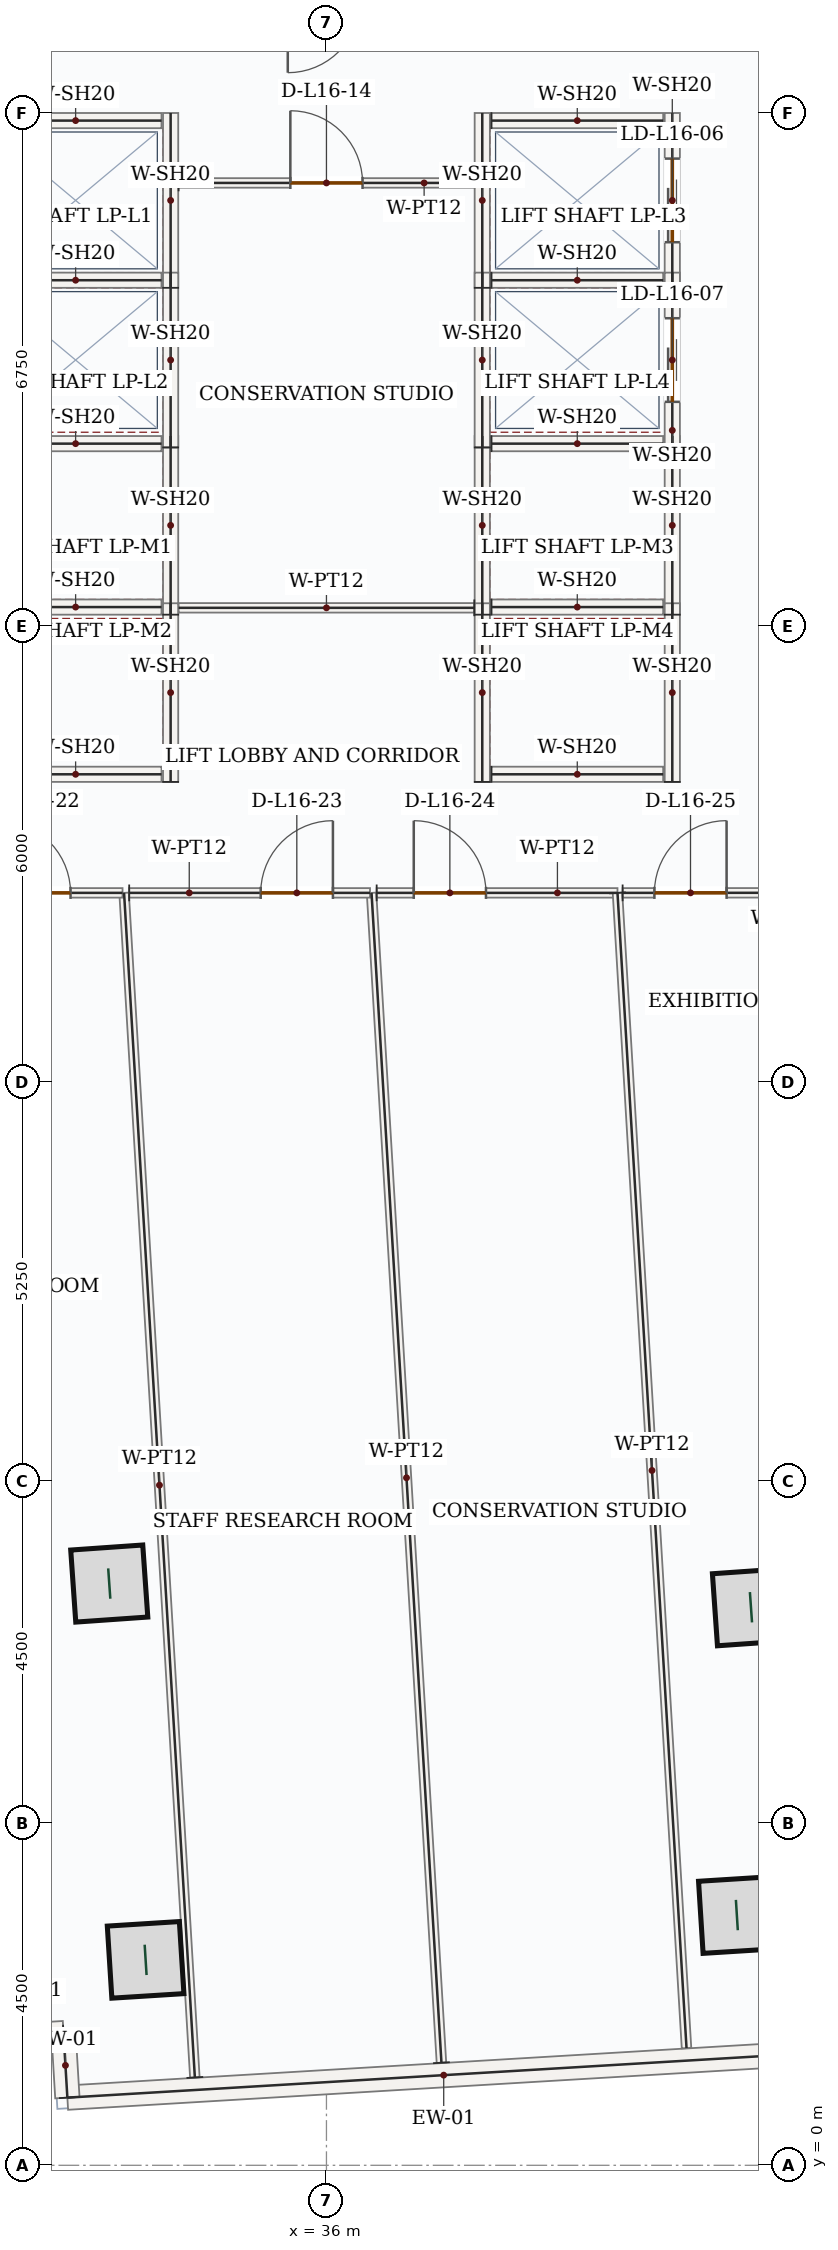
"""IFC4 building model, lengths in metres.
Left out: names, types, materials, properties, quantities, classifications, styles, units other than length and angle.
Written with IfcOpenShell. Run it as: python <this file> out.ifc"""

import sys

from ifc_helpers import new_model, si_unit, direction, frame, frame_2d, origin, origin_2d, place, context, subcontext, project, spatial, rectangle, hollow_rectangle, extrude, source, transform, mapped, element, fill, save


model = new_model("IFC4")
c1 = context("Model", 3, precision=1e-05, world=origin(), true_north=direction((0.0, 1.0)))
c2 = subcontext(c1, "Body", "Model", "MODEL_VIEW")
j1 = project(units=[si_unit("LENGTHUNIT", "METRE"), si_unit("PLANEANGLEUNIT", "RADIAN")], contexts=[c1])
p1 = place(None, origin())
s1 = spatial("IfcSite", under=j1, at=p1, CompositionType="ELEMENT")
p2 = place(p1, origin())
s2 = spatial("IfcBuilding", under=s1, at=p2, CompositionType="ELEMENT")
p3 = place(p2, frame((0.0, 0.0, 75.3)))
s3 = spatial("IfcBuildingStorey", under=s2, at=p3, CompositionType="ELEMENT", Elevation=75.3)
m1 = source(origin(), c2, "Body", "SweptSolid", [
    extrude(hollow_rectangle(XDim=0.95, YDim=0.95, WallThickness=0.05, at=origin_2d()), origin(), (0.0, 0.0, 1.0), 4.2),
])
for number, where, z_axis, x_axis in (
    (1, (33.143, 7.654, 0.0), (0.0, 0.0, 1.0), (-0.07, 0.998, 0.0)),
    (2, (41.585, 7.342, 0.0), (0.0, 0.0, 1.0), (-0.07, 0.998, 0.0)),
    (3, (33.621, 2.703, 0.0), (0.0, 0.0, 1.0), (-0.063, 0.998, 0.0)),
    (4, (41.399, 3.292, 0.0), (0.0, 0.0, 1.0), (-0.063, 0.998, 0.0)),
):
    element("IfcColumn", number, at=place(p3, frame(where, z_axis=z_axis, x_axis=x_axis)), inside=s3, PredefinedType="COLUMN", context=c2, shape_type="MappedRepresentation", body=[
        mapped(m1, transform((0.0, 0.0, 0.0), x_axis=(1.0, 0.0, 0.0), y_axis=(0.0, 1.0, 0.0), z_axis=(0.0, 0.0, 1.0), scale=1.0)),
    ])
m2 = source(origin(), c2, "Body", "SweptSolid", [
    extrude(rectangle(XDim=9.92, YDim=0.32, at=frame_2d((4.96, 0.0))), origin(), (0.0, 0.0, 1.0), 3.95),
])
p4 = place(p3, frame((42.494, 1.482, 0.0), z_axis=(0.0, 0.0, 1.0), x_axis=(-0.998218942745, -0.059656871726, 0.0)))
e5 = element("IfcWall", 5, at=p4, inside=s3, PredefinedType="SOLIDWALL", context=c2, shape_type="MappedRepresentation", body=[
    mapped(m2, transform((0.0, 0.0, 0.0), x_axis=(1.0, 0.0, 0.0), y_axis=(0.0, 1.0, 0.0), z_axis=(0.0, 0.0, 1.0), scale=1.0)),
])
m3 = source(origin(), c2, "Body", "SweptSolid", [
    extrude(rectangle(XDim=0.85, YDim=0.32, at=frame_2d((0.425, 0.0))), origin(), (0.0, 0.0, 1.0), 3.95),
])
p5 = place(p3, frame((32.592, 0.89, 0.0), z_axis=(0.0, 0.0, 1.0), x_axis=(-0.059732049764, 0.998214447016, 0.0)))
e6 = element("IfcWall", 6, at=p5, inside=s3, PredefinedType="SOLIDWALL", context=c2, shape_type="MappedRepresentation", body=[
    mapped(m3, transform((0.0, 0.0, 0.0), x_axis=(1.0, 0.0, 0.0), y_axis=(0.0, 1.0, 0.0), z_axis=(0.0, 0.0, 1.0), scale=1.0)),
])
m4 = source(origin(), c2, "Body", "SweptSolid", [
    extrude(rectangle(XDim=0.85, YDim=0.32, at=frame_2d((0.425, 0.0))), origin(), (0.0, 0.0, 1.0), 3.95),
])
p6 = place(p3, frame((32.541, 1.739, 0.0), z_axis=(0.0, 0.0, 1.0), x_axis=(-0.998213421964, -0.059749177487, 0.0)))
e7 = element("IfcWall", 7, at=p6, inside=s3, PredefinedType="SOLIDWALL", context=c2, shape_type="MappedRepresentation", body=[
    mapped(m4, transform((0.0, 0.0, 0.0), x_axis=(1.0, 0.0, 0.0), y_axis=(0.0, 1.0, 0.0), z_axis=(0.0, 0.0, 1.0), scale=1.0)),
])
m5 = source(origin(), c2, "Body", "SweptSolid", [
    extrude(rectangle(XDim=2.35, YDim=0.2, at=frame_2d((1.175, 0.0))), origin(), (0.0, 0.0, 1.0), 3.95),
])
p7 = place(p3, frame((33.95, 20.4, 0.0), z_axis=(0.0, 0.0, 1.0), x_axis=(0.0, 1.0, 0.0)))
e8 = element("IfcWall", 8, at=p7, inside=s3, PredefinedType="SOLIDWALL", context=c2, shape_type="MappedRepresentation", body=[
    mapped(m5, transform((0.0, 0.0, 0.0), x_axis=(1.0, 0.0, 0.0), y_axis=(0.0, 1.0, 0.0), z_axis=(0.0, 0.0, 1.0), scale=1.0)),
])
m6 = source(origin(), c2, "Body", "SweptSolid", [
    extrude(rectangle(XDim=2.26, YDim=0.2, at=frame_2d((1.13, 0.0))), origin(), (0.0, 0.0, 1.0), 3.95),
])
for number, where, z_axis, x_axis in (
    (9, (31.57, 20.5, 0.0), (0.0, 0.0, 1.0), (1.0, 0.0, 0.0)),
    (10, (31.57, 22.65, 0.0), (0.0, 0.0, 1.0), (1.0, 0.0, 0.0)),
):
    element("IfcWall", number, at=place(p3, frame(where, z_axis=z_axis, x_axis=x_axis)), inside=s3, PredefinedType="SOLIDWALL", context=c2, shape_type="MappedRepresentation", body=[
        mapped(m6, transform((0.0, 0.0, 0.0), x_axis=(1.0, 0.0, 0.0), y_axis=(0.0, 1.0, 0.0), z_axis=(0.0, 0.0, 1.0), scale=1.0)),
    ])
p8 = place(p3, frame((33.95, 18.2, 0.0), z_axis=(0.0, 0.0, 1.0), x_axis=(0.0, 1.0, 0.0)))
e11 = element("IfcWall", 11, at=p8, inside=s3, PredefinedType="SOLIDWALL", context=c2, shape_type="MappedRepresentation", body=[
    mapped(m5, transform((0.0, 0.0, 0.0), x_axis=(1.0, 0.0, 0.0), y_axis=(0.0, 1.0, 0.0), z_axis=(0.0, 0.0, 1.0), scale=1.0)),
])
p9 = place(p3, frame((31.57, 18.3, 0.0), z_axis=(0.0, 0.0, 1.0), x_axis=(1.0, 0.0, 0.0)))
e12 = element("IfcWall", 12, at=p9, inside=s3, PredefinedType="SOLIDWALL", context=c2, shape_type="MappedRepresentation", body=[
    mapped(m6, transform((0.0, 0.0, 0.0), x_axis=(1.0, 0.0, 0.0), y_axis=(0.0, 1.0, 0.0), z_axis=(0.0, 0.0, 1.0), scale=1.0)),
])
for number, where, z_axis, x_axis in (
    (13, (38.05, 20.4, 0.0), (0.0, 0.0, 1.0), (0.0, 1.0, 0.0)),
    (14, (40.55, 20.4, 0.0), (0.0, 0.0, 1.0), (0.0, 1.0, 0.0)),
):
    element("IfcWall", number, at=place(p3, frame(where, z_axis=z_axis, x_axis=x_axis)), inside=s3, PredefinedType="SOLIDWALL", context=c2, shape_type="MappedRepresentation", body=[
        mapped(m5, transform((0.0, 0.0, 0.0), x_axis=(1.0, 0.0, 0.0), y_axis=(0.0, 1.0, 0.0), z_axis=(0.0, 0.0, 1.0), scale=1.0)),
    ])
for number, where, z_axis, x_axis in (
    (15, (38.17, 20.5, 0.0), (0.0, 0.0, 1.0), (1.0, 0.0, 0.0)),
    (16, (38.17, 22.65, 0.0), (0.0, 0.0, 1.0), (1.0, 0.0, 0.0)),
):
    element("IfcWall", number, at=place(p3, frame(where, z_axis=z_axis, x_axis=x_axis)), inside=s3, PredefinedType="SOLIDWALL", context=c2, shape_type="MappedRepresentation", body=[
        mapped(m6, transform((0.0, 0.0, 0.0), x_axis=(1.0, 0.0, 0.0), y_axis=(0.0, 1.0, 0.0), z_axis=(0.0, 0.0, 1.0), scale=1.0)),
    ])
for number, where, z_axis, x_axis in (
    (17, (38.05, 18.2, 0.0), (0.0, 0.0, 1.0), (0.0, 1.0, 0.0)),
    (18, (40.55, 18.2, 0.0), (0.0, 0.0, 1.0), (0.0, 1.0, 0.0)),
):
    element("IfcWall", number, at=place(p3, frame(where, z_axis=z_axis, x_axis=x_axis)), inside=s3, PredefinedType="SOLIDWALL", context=c2, shape_type="MappedRepresentation", body=[
        mapped(m5, transform((0.0, 0.0, 0.0), x_axis=(1.0, 0.0, 0.0), y_axis=(0.0, 1.0, 0.0), z_axis=(0.0, 0.0, 1.0), scale=1.0)),
    ])
p10 = place(p3, frame((38.17, 18.3, 0.0), z_axis=(0.0, 0.0, 1.0), x_axis=(1.0, 0.0, 0.0)))
e19 = element("IfcWall", 19, at=p10, inside=s3, PredefinedType="SOLIDWALL", context=c2, shape_type="MappedRepresentation", body=[
    mapped(m6, transform((0.0, 0.0, 0.0), x_axis=(1.0, 0.0, 0.0), y_axis=(0.0, 1.0, 0.0), z_axis=(0.0, 0.0, 1.0), scale=1.0)),
])
m7 = source(origin(), c2, "Body", "SweptSolid", [
    extrude(rectangle(XDim=2.3, YDim=0.2, at=frame_2d((1.15, 0.0))), origin(), (0.0, 0.0, 1.0), 3.95),
])
p11 = place(p3, frame((33.95, 24.7, 0.0), z_axis=(0.0, 0.0, 1.0), x_axis=(0.0, 1.0, 0.0)))
e20 = element("IfcWall", 20, at=p11, inside=s3, PredefinedType="SOLIDWALL", context=c2, shape_type="MappedRepresentation", body=[
    mapped(m7, transform((0.0, 0.0, 0.0), x_axis=(1.0, 0.0, 0.0), y_axis=(0.0, 1.0, 0.0), z_axis=(0.0, 0.0, 1.0), scale=1.0)),
])
for number, where, z_axis, x_axis in (
    (21, (31.57, 24.8, 0.0), (0.0, 0.0, 1.0), (1.0, 0.0, 0.0)),
    (22, (31.57, 26.9, 0.0), (0.0, 0.0, 1.0), (1.0, 0.0, 0.0)),
):
    element("IfcWall", number, at=place(p3, frame(where, z_axis=z_axis, x_axis=x_axis)), inside=s3, PredefinedType="SOLIDWALL", context=c2, shape_type="MappedRepresentation", body=[
        mapped(m6, transform((0.0, 0.0, 0.0), x_axis=(1.0, 0.0, 0.0), y_axis=(0.0, 1.0, 0.0), z_axis=(0.0, 0.0, 1.0), scale=1.0)),
    ])
m8 = source(origin(), c2, "Body", "SweptSolid", [
    extrude(rectangle(XDim=2.3, YDim=0.2, at=frame_2d((1.15, 0.0))), origin(), (0.0, 0.0, 1.0), 3.95),
])
p12 = place(p3, frame((33.95, 22.6, 0.0), z_axis=(0.0, 0.0, 1.0), x_axis=(0.0, 1.0, 0.0)))
e23 = element("IfcWall", 23, at=p12, inside=s3, PredefinedType="SOLIDWALL", context=c2, shape_type="MappedRepresentation", body=[
    mapped(m8, transform((0.0, 0.0, 0.0), x_axis=(1.0, 0.0, 0.0), y_axis=(0.0, 1.0, 0.0), z_axis=(0.0, 0.0, 1.0), scale=1.0)),
])
p13 = place(p3, frame((38.05, 24.7, 0.0), z_axis=(0.0, 0.0, 1.0), x_axis=(0.0, 1.0, 0.0)))
e24 = element("IfcWall", 24, at=p13, inside=s3, PredefinedType="SOLIDWALL", context=c2, shape_type="MappedRepresentation", body=[
    mapped(m7, transform((0.0, 0.0, 0.0), x_axis=(1.0, 0.0, 0.0), y_axis=(0.0, 1.0, 0.0), z_axis=(0.0, 0.0, 1.0), scale=1.0)),
])
p14 = place(p3, frame((40.55, 24.7, 0.0), z_axis=(0.0, 0.0, 1.0), x_axis=(0.0, 1.0, 0.0)))
e25 = element("IfcWall", 25, at=p14, inside=s3, PredefinedType="SOLIDWALL", context=c2, shape_type="SweptSolid", body=[
    extrude(rectangle(XDim=2.3, YDim=0.2, at=frame_2d((1.15, 0.0))), origin(), (0.0, 0.0, 1.0), 3.95),
])
p15 = place(p14, frame((0.6, 0.0, 0.0)))
e26 = element("IfcOpeningElement", 26, at=p15, cuts=e25, PredefinedType="OPENING", context=c2, shape_type="SweptSolid", body=[
    extrude(rectangle(XDim=1.1, YDim=2.15, at=frame_2d((0.55, 1.075))), frame((0.0, 0.11, 0.0), z_axis=(0.0, -1.0, 0.0), x_axis=(1.0, 0.0, 0.0)), (0.0, 0.0, 1.0), 0.22),
])
for number, where, z_axis, x_axis in (
    (27, (38.17, 24.8, 0.0), (0.0, 0.0, 1.0), (1.0, 0.0, 0.0)),
    (28, (38.17, 26.9, 0.0), (0.0, 0.0, 1.0), (1.0, 0.0, 0.0)),
):
    element("IfcWall", number, at=place(p3, frame(where, z_axis=z_axis, x_axis=x_axis)), inside=s3, PredefinedType="SOLIDWALL", context=c2, shape_type="MappedRepresentation", body=[
        mapped(m6, transform((0.0, 0.0, 0.0), x_axis=(1.0, 0.0, 0.0), y_axis=(0.0, 1.0, 0.0), z_axis=(0.0, 0.0, 1.0), scale=1.0)),
    ])
p16 = place(p3, frame((38.05, 22.6, 0.0), z_axis=(0.0, 0.0, 1.0), x_axis=(0.0, 1.0, 0.0)))
e29 = element("IfcWall", 29, at=p16, inside=s3, PredefinedType="SOLIDWALL", context=c2, shape_type="MappedRepresentation", body=[
    mapped(m8, transform((0.0, 0.0, 0.0), x_axis=(1.0, 0.0, 0.0), y_axis=(0.0, 1.0, 0.0), z_axis=(0.0, 0.0, 1.0), scale=1.0)),
])
p17 = place(p3, frame((40.55, 22.6, 0.0), z_axis=(0.0, 0.0, 1.0), x_axis=(0.0, 1.0, 0.0)))
e30 = element("IfcWall", 30, at=p17, inside=s3, PredefinedType="SOLIDWALL", context=c2, shape_type="SweptSolid", body=[
    extrude(rectangle(XDim=2.3, YDim=0.2, at=frame_2d((1.15, 0.0))), origin(), (0.0, 0.0, 1.0), 3.95),
])
p18 = place(p17, frame((0.6, 0.0, 0.0)))
e31 = element("IfcOpeningElement", 31, at=p18, cuts=e30, PredefinedType="OPENING", context=c2, shape_type="SweptSolid", body=[
    extrude(rectangle(XDim=1.1, YDim=2.15, at=frame_2d((0.55, 1.075))), frame((0.0, 0.11, 0.0), z_axis=(0.0, -1.0, 0.0), x_axis=(1.0, 0.0, 0.0)), (0.0, 0.0, 1.0), 0.22),
])
p19 = place(p3, frame((34.055, 26.08, 0.0), z_axis=(0.0, 0.0, 1.0), x_axis=(1.0, 0.0, 0.0)))
e32 = element("IfcWall", 32, at=p19, inside=s3, PredefinedType="PARTITIONING", context=c2, shape_type="SweptSolid", body=[
    extrude(rectangle(XDim=3.89, YDim=0.125, at=frame_2d((1.945, 0.0))), origin(), (0.0, 0.0, 1.0), 3.95),
])
p20 = place(p19, frame((1.47, 0.0, 0.0)))
e33 = element("IfcOpeningElement", 33, at=p20, cuts=e32, PredefinedType="OPENING", context=c2, shape_type="SweptSolid", body=[
    extrude(rectangle(XDim=0.95, YDim=2.15, at=frame_2d((0.475, 1.075))), frame((0.0, 0.073, 0.0), z_axis=(0.0, -1.0, 0.0), x_axis=(1.0, 0.0, 0.0)), (0.0, 0.0, 1.0), 0.145),
])
m9 = source(origin(), c2, "Body", "SweptSolid", [
    extrude(rectangle(XDim=3.89, YDim=0.125, at=frame_2d((1.945, 0.0))), origin(), (0.0, 0.0, 1.0), 3.95),
])
p21 = place(p3, frame((37.945, 20.49, 0.0), z_axis=(0.0, 0.0, 1.0), x_axis=(-1.0, 0.0, 0.0)))
e34 = element("IfcWall", 34, at=p21, inside=s3, PredefinedType="PARTITIONING", context=c2, shape_type="MappedRepresentation", body=[
    mapped(m9, transform((0.0, 0.0, 0.0), x_axis=(1.0, 0.0, 0.0), y_axis=(0.0, 1.0, 0.0), z_axis=(0.0, 0.0, 1.0), scale=1.0)),
])
m10 = source(origin(), c2, "Body", "SweptSolid", [
    extrude(rectangle(XDim=15.418, YDim=0.125, at=frame_2d((7.709, 0.0))), origin(), (0.0, 0.0, 1.0), 3.95),
])
p22 = place(p3, frame((37.513, 1.35, 0.0), z_axis=(0.0, 0.0, 1.0), x_axis=(-0.059666030768, 0.998218395329, 0.0)))
e35 = element("IfcWall", 35, at=p22, inside=s3, PredefinedType="PARTITIONING", context=c2, shape_type="MappedRepresentation", body=[
    mapped(m10, transform((0.0, 0.0, 0.0), x_axis=(1.0, 0.0, 0.0), y_axis=(0.0, 1.0, 0.0), z_axis=(0.0, 0.0, 1.0), scale=1.0)),
])
p23 = place(p3, frame((36.661, 16.74, 0.0), z_axis=(0.0, 0.0, 1.0), x_axis=(1.0, 0.0, 0.0)))
e36 = element("IfcWall", 36, at=p23, inside=s3, PredefinedType="PARTITIONING", context=c2, shape_type="SweptSolid", body=[
    extrude(rectangle(XDim=3.168, YDim=0.125, at=frame_2d((1.584, 0.0))), origin(), (0.0, 0.0, 1.0), 3.95),
])
p24 = place(p23, frame((0.488, 0.0, 0.0)))
e37 = element("IfcOpeningElement", 37, at=p24, cuts=e36, PredefinedType="OPENING", context=c2, shape_type="SweptSolid", body=[
    extrude(rectangle(XDim=0.95, YDim=2.15, at=frame_2d((0.475, 1.075))), frame((0.0, 0.073, 0.0), z_axis=(0.0, -1.0, 0.0), x_axis=(1.0, 0.0, 0.0)), (0.0, 0.0, 1.0), 0.145),
])
m11 = source(origin(), c2, "Body", "SweptSolid", [
    extrude(rectangle(XDim=15.225, YDim=0.125, at=frame_2d((7.612, 0.0))), origin(), (0.0, 0.0, 1.0), 3.95),
])
p25 = place(p3, frame((39.829, 16.74, 0.0), z_axis=(0.0, 0.0, 1.0), x_axis=(0.059652617074, -0.998219197008, 0.0)))
e38 = element("IfcWall", 38, at=p25, inside=s3, PredefinedType="PARTITIONING", context=c2, shape_type="MappedRepresentation", body=[
    mapped(m11, transform((0.0, 0.0, 0.0), x_axis=(1.0, 0.0, 0.0), y_axis=(0.0, 1.0, 0.0), z_axis=(0.0, 0.0, 1.0), scale=1.0)),
])
m12 = source(origin(), c2, "Body", "SweptSolid", [
    extrude(rectangle(XDim=15.612, YDim=0.125, at=frame_2d((7.806, 0.0))), origin(), (0.0, 0.0, 1.0), 3.95),
])
p26 = place(p3, frame((34.269, 1.156, 0.0), z_axis=(0.0, 0.0, 1.0), x_axis=(-0.059658872533, 0.998218823169, 0.0)))
e39 = element("IfcWall", 39, at=p26, inside=s3, PredefinedType="PARTITIONING", context=c2, shape_type="MappedRepresentation", body=[
    mapped(m12, transform((0.0, 0.0, 0.0), x_axis=(1.0, 0.0, 0.0), y_axis=(0.0, 1.0, 0.0), z_axis=(0.0, 0.0, 1.0), scale=1.0)),
])
p27 = place(p3, frame((33.405, 16.74, 0.0), z_axis=(0.0, 0.0, 1.0), x_axis=(1.0, 0.0, 0.0)))
e40 = element("IfcWall", 40, at=p27, inside=s3, PredefinedType="PARTITIONING", context=c2, shape_type="SweptSolid", body=[
    extrude(rectangle(XDim=3.168, YDim=0.125, at=frame_2d((1.584, 0.0))), origin(), (0.0, 0.0, 1.0), 3.95),
])
p28 = place(p27, frame((1.73, 0.0, 0.0)))
e41 = element("IfcOpeningElement", 41, at=p28, cuts=e40, PredefinedType="OPENING", context=c2, shape_type="SweptSolid", body=[
    extrude(rectangle(XDim=0.95, YDim=2.15, at=frame_2d((0.475, 1.075))), frame((0.0, 0.073, 0.0), z_axis=(0.0, -1.0, 0.0), x_axis=(1.0, 0.0, 0.0)), (0.0, 0.0, 1.0), 0.145),
])
p29 = place(p3, frame((29.258, 16.74, 0.0), z_axis=(0.0, 0.0, 1.0), x_axis=(0.999999998192, -6.0135907e-05, 0.0)))
e42 = element("IfcWall", 42, at=p29, inside=s3, PredefinedType="PARTITIONING", context=c2, shape_type="SweptSolid", body=[
    extrude(rectangle(XDim=4.06, YDim=0.125, at=frame_2d((2.03, 0.0))), origin(), (0.0, 0.0, 1.0), 3.95),
])
p30 = place(p29, frame((2.426, 0.0, 0.0)))
e43 = element("IfcOpeningElement", 43, at=p30, cuts=e42, PredefinedType="OPENING", context=c2, shape_type="SweptSolid", body=[
    extrude(rectangle(XDim=0.95, YDim=2.15, at=frame_2d((0.475, 1.075))), frame((0.0, 0.073, 0.0), z_axis=(0.0, -1.0, 0.0), x_axis=(1.0, 0.0, 0.0)), (0.0, 0.0, 1.0), 0.145),
])
p31 = place(p3, frame((39.896, 16.74, 0.0), z_axis=(0.0, 0.0, 1.0), x_axis=(0.999999908279, 0.000428302171, 0.0)))
e44 = element("IfcWall", 44, at=p31, inside=s3, PredefinedType="PARTITIONING", context=c2, shape_type="SweptSolid", body=[
    extrude(rectangle(XDim=2.85, YDim=0.125, at=frame_2d((1.425, 0.0))), origin(), (0.0, 0.0, 1.0), 3.95),
])
p32 = place(p31, frame((0.418, 0.0, 0.0)))
e45 = element("IfcOpeningElement", 45, at=p32, cuts=e44, PredefinedType="OPENING", context=c2, shape_type="SweptSolid", body=[
    extrude(rectangle(XDim=0.95, YDim=2.15, at=frame_2d((0.475, 1.075))), frame((0.0, 0.073, 0.0), z_axis=(0.0, -1.0, 0.0), x_axis=(1.0, 0.0, 0.0)), (0.0, 0.0, 1.0), 0.145),
])
m13 = source(origin(), c2, "Body", "SweptSolid", [
    extrude(rectangle(XDim=1.1, YDim=2.15, at=frame_2d((0.55, 1.075))), frame((0.0, 0.025, 0.0), z_axis=(0.0, -1.0, 0.0), x_axis=(1.0, 0.0, 0.0)), (0.0, 0.0, 1.0), 0.05),
])
p33 = place(p15, origin())
e46 = element("IfcDoor", 46, at=p33, inside=s3, OperationType="DOUBLE_DOOR_SLIDING", PredefinedType="DOOR", context=c2, shape_type="MappedRepresentation", body=[
    mapped(m13, transform((0.0, 0.0, 0.0), x_axis=(1.0, 0.0, 0.0), y_axis=(0.0, 1.0, 0.0), z_axis=(0.0, 0.0, 1.0), scale=1.0)),
])
fill(e26, e46)
p34 = place(p18, origin())
e47 = element("IfcDoor", 47, at=p34, inside=s3, OperationType="DOUBLE_DOOR_SLIDING", PredefinedType="DOOR", context=c2, shape_type="MappedRepresentation", body=[
    mapped(m13, transform((0.0, 0.0, 0.0), x_axis=(1.0, 0.0, 0.0), y_axis=(0.0, 1.0, 0.0), z_axis=(0.0, 0.0, 1.0), scale=1.0)),
])
fill(e31, e47)
m14 = source(origin(), c2, "Body", "SweptSolid", [
    extrude(rectangle(XDim=0.95, YDim=2.15, at=frame_2d((0.475, 1.075))), frame((0.0, 0.025, 0.0), z_axis=(0.0, -1.0, 0.0), x_axis=(1.0, 0.0, 0.0)), (0.0, 0.0, 1.0), 0.05),
])
p35 = place(p20, origin())
e48 = element("IfcDoor", 48, at=p35, inside=s3, OperationType="SINGLE_SWING_LEFT", PredefinedType="DOOR", context=c2, shape_type="MappedRepresentation", body=[
    mapped(m14, transform((0.0, 0.0, 0.0), x_axis=(1.0, 0.0, 0.0), y_axis=(0.0, 1.0, 0.0), z_axis=(0.0, 0.0, 1.0), scale=1.0)),
])
fill(e33, e48)
p36 = place(p30, origin())
e49 = element("IfcDoor", 49, at=p36, inside=s3, OperationType="SINGLE_SWING_LEFT", PredefinedType="DOOR", context=c2, shape_type="MappedRepresentation", body=[
    mapped(m14, transform((0.0, 0.0, 0.0), x_axis=(1.0, 0.0, 0.0), y_axis=(0.0, 1.0, 0.0), z_axis=(0.0, 0.0, 1.0), scale=1.0)),
])
fill(e43, e49)
p37 = place(p28, origin())
e50 = element("IfcDoor", 50, at=p37, inside=s3, OperationType="SINGLE_SWING_RIGHT", PredefinedType="DOOR", context=c2, shape_type="MappedRepresentation", body=[
    mapped(m14, transform((0.0, 0.0, 0.0), x_axis=(1.0, 0.0, 0.0), y_axis=(0.0, 1.0, 0.0), z_axis=(0.0, 0.0, 1.0), scale=1.0)),
])
fill(e41, e50)
p38 = place(p24, origin())
e51 = element("IfcDoor", 51, at=p38, inside=s3, OperationType="SINGLE_SWING_LEFT", PredefinedType="DOOR", context=c2, shape_type="MappedRepresentation", body=[
    mapped(m14, transform((0.0, 0.0, 0.0), x_axis=(1.0, 0.0, 0.0), y_axis=(0.0, 1.0, 0.0), z_axis=(0.0, 0.0, 1.0), scale=1.0)),
])
fill(e37, e51)
p39 = place(p32, origin())
e52 = element("IfcDoor", 52, at=p39, inside=s3, OperationType="SINGLE_SWING_RIGHT", PredefinedType="DOOR", context=c2, shape_type="MappedRepresentation", body=[
    mapped(m14, transform((0.0, 0.0, 0.0), x_axis=(1.0, 0.0, 0.0), y_axis=(0.0, 1.0, 0.0), z_axis=(0.0, 0.0, 1.0), scale=1.0)),
])
fill(e45, e52)
save(model, sys.argv[1])
